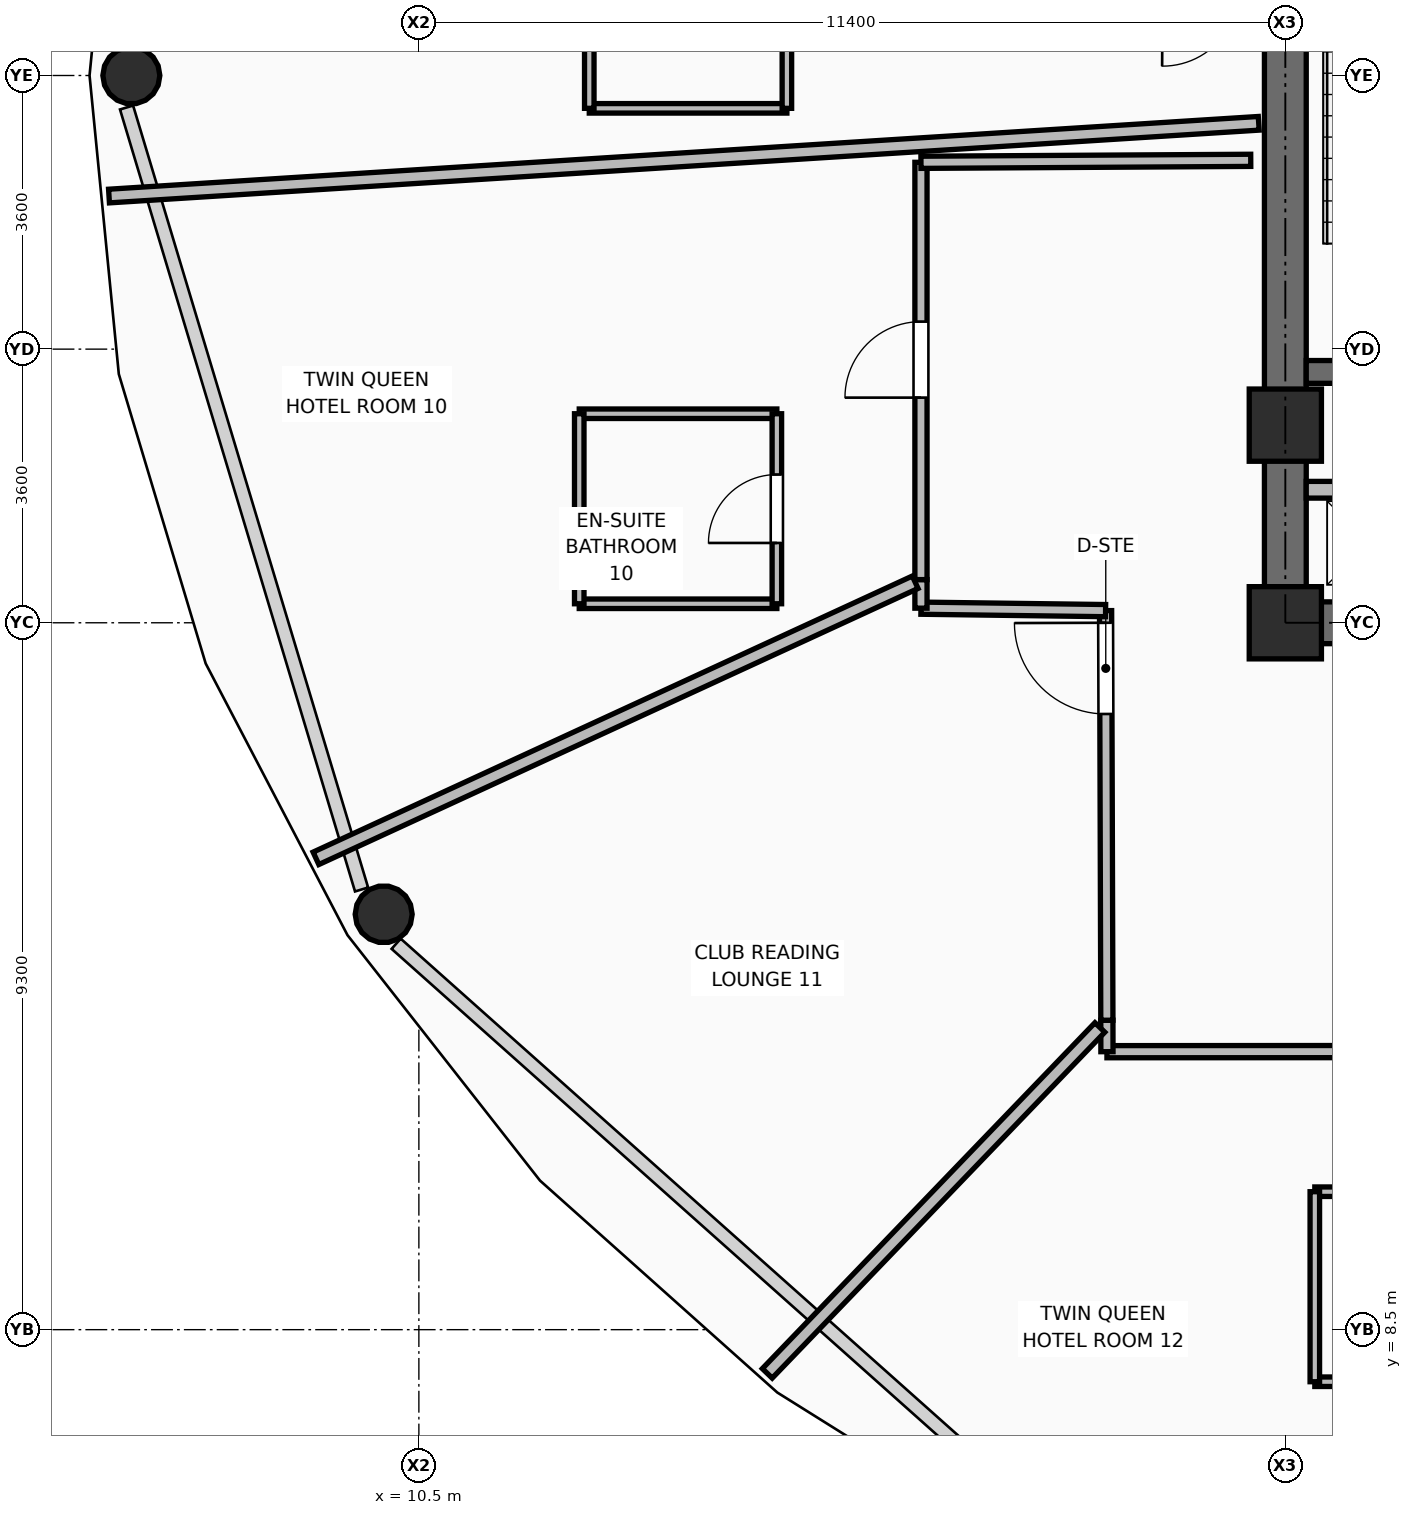
"""IFC4 building model, lengths in metres.
Left out: names, types, materials, properties, quantities, classifications, styles, units other than length and angle.
Written with IfcOpenShell. Run it as: python <this file> out.ifc"""

import sys

from ifc_helpers import new_model, si_unit, direction, frame, frame_2d, origin, origin_2d, place, context, subcontext, project, spatial, rectangle, hollow_circle, extrude, element, fill, save


model = new_model("IFC4")
c1 = context("Model", 3, precision=1e-05, world=origin(), true_north=direction((0.0, 1.0)))
c2 = subcontext(c1, "Body", "Model", "MODEL_VIEW")
j1 = project(units=[si_unit("LENGTHUNIT", "METRE"), si_unit("PLANEANGLEUNIT", "RADIAN")], contexts=[c1])
p1 = place(None, origin())
s1 = spatial("IfcSite", under=j1, at=p1, CompositionType="ELEMENT")
p2 = place(p1, origin())
s2 = spatial("IfcBuilding", under=s1, at=p2, CompositionType="ELEMENT")
p3 = place(p2, frame((0.0, 0.0, 153.45)))
s3 = spatial("IfcBuildingStorey", under=s2, at=p3, CompositionType="ELEMENT", Elevation=153.45)
for number, where, z_axis, x_axis in (
    (1, (21.9, 17.8, 0.0), (0.0, 0.0, 1.0), (1.0, 0.0, 0.0)),
    (2, (21.9, 20.4, 0.0), (0.0, 0.0, 1.0), (1.0, 0.0, 0.0)),
):
    element("IfcColumn", number, at=place(p3, frame(where, z_axis=z_axis, x_axis=x_axis)), inside=s3, PredefinedType="COLUMN", context=c2, shape_type="SweptSolid", body=[
        extrude(rectangle(XDim=0.95, YDim=0.95, at=origin_2d()), origin(), (0.0, 0.0, 1.0), 3.75),
    ])
for number, where, z_axis, x_axis in (
    (3, (6.717, 25.0, 0.0), (0.0, 0.0, 1.0), (1.0, 0.0, 0.0)),
    (4, (10.037, 13.965, 0.0), (0.0, 0.0, 1.0), (1.0, 0.0, 0.0)),
):
    element("IfcColumn", number, at=place(p3, frame(where, z_axis=z_axis, x_axis=x_axis)), inside=s3, PredefinedType="COLUMN", context=c2, shape_type="SweptSolid", body=[
        extrude(hollow_circle(Radius=0.375, WallThickness=0.035, at=origin_2d()), origin(), (0.0, 0.0, 1.0), 3.57),
    ])
p4 = place(p3, frame((21.625, 17.8, 0.0), z_axis=(0.0, 0.0, 1.0), x_axis=(1.0, 0.0, 0.0)))
e5 = element("IfcWall", 5, at=p4, inside=s3, PredefinedType="SHEAR", context=c2, shape_type="SweptSolid", body=[
    extrude(rectangle(XDim=2.125, YDim=0.55, at=frame_2d((1.062, 0.0))), origin(), (0.0, 0.0, 1.0), 3.57),
])
p5 = place(p3, frame((21.9, 18.075, 0.0), z_axis=(0.0, 0.0, 1.0), x_axis=(0.0, 1.0, 0.0)))
e6 = element("IfcWall", 6, at=p5, inside=s3, PredefinedType="SHEAR", context=c2, shape_type="SweptSolid", body=[
    extrude(rectangle(XDim=14.1, YDim=0.55, at=frame_2d((7.05, 0.0))), origin(), (0.0, 0.0, 1.0), 3.57),
])
p6 = place(p3, frame((22.175, 21.1, 0.0), z_axis=(0.0, 0.0, 1.0), x_axis=(1.0, 0.0, 0.0)))
e7 = element("IfcWall", 7, at=p6, inside=s3, PredefinedType="SHEAR", context=c2, shape_type="SweptSolid", body=[
    extrude(rectangle(XDim=3.565, YDim=0.3, at=frame_2d((1.782, 0.0))), origin(), (0.0, 0.0, 1.0), 3.57),
])
p7 = place(p6, frame((2.045, 0.0, 0.0)))
e8 = element("IfcOpeningElement", 8, at=p7, cuts=e7, PredefinedType="OPENING", context=c2, shape_type="SweptSolid", body=[
    extrude(rectangle(XDim=1.05, YDim=2.1, at=frame_2d((0.525, 1.05))), frame((0.0, 0.16, 0.0), z_axis=(0.0, -1.0, 0.0), x_axis=(1.0, 0.0, 0.0)), (0.0, 0.0, 1.0), 0.32),
])
p8 = place(p3, frame((22.175, 19.55, 0.0), z_axis=(0.0, 0.0, 1.0), x_axis=(1.0, 0.0, 0.0)))
e9 = element("IfcWall", 9, at=p8, inside=s3, PredefinedType="PARTITIONING", context=c2, shape_type="SweptSolid", body=[
    extrude(rectangle(XDim=1.615, YDim=0.22, at=frame_2d((0.808, 0.0))), origin(), (0.0, 0.0, 1.0), 2.595),
])
p9 = place(p3, frame((26.886, 12.16, 0.0), z_axis=(0.0, 0.0, 1.0), x_axis=(-0.999999920192, -0.000399520543, 0.0)))
e10 = element("IfcWall", 10, at=p9, inside=s3, PredefinedType="PARTITIONING", context=c2, shape_type="SweptSolid", body=[
    extrude(rectangle(XDim=7.333, YDim=0.16, at=frame_2d((3.667, 0.0))), origin(), (0.0, 0.0, 1.0), 3.006),
])
p10 = place(p9, frame((3.24, 0.0, 0.0)))
e11 = element("IfcOpeningElement", 11, at=p10, cuts=e10, PredefinedType="OPENING", context=c2, shape_type="SweptSolid", body=[
    extrude(rectangle(XDim=1.0, YDim=2.1, at=frame_2d((0.5, 1.05))), frame((0.0, 0.09, 0.0), z_axis=(0.0, -1.0, 0.0), x_axis=(1.0, 0.0, 0.0)), (0.0, 0.0, 1.0), 0.18),
])
p11 = place(p3, frame((19.553, 12.157, 0.0), z_axis=(0.0, 0.0, 1.0), x_axis=(-0.002358484007, 0.999997218773, 0.0)))
e12 = element("IfcWall", 12, at=p11, inside=s3, PredefinedType="PARTITIONING", context=c2, shape_type="SweptSolid", body=[
    extrude(rectangle(XDim=0.414, YDim=0.16, at=frame_2d((0.207, 0.0))), origin(), (0.0, 0.0, 1.0), 3.55),
])
p12 = place(p3, frame((19.552, 12.571, 0.0), z_axis=(0.0, 0.0, 1.0), x_axis=(-0.003171279301, 0.999994971481, 0.0)))
e13 = element("IfcWall", 13, at=p12, inside=s3, PredefinedType="PARTITIONING", context=c2, shape_type="SweptSolid", body=[
    extrude(rectangle(XDim=5.389, YDim=0.16, at=frame_2d((2.694, 0.0))), origin(), (0.0, 0.0, 1.0), 3.006),
])
p13 = place(p12, frame((4.029, 0.0, 0.0)))
e14 = element("IfcOpeningElement", 14, at=p13, cuts=e13, PredefinedType="OPENING", context=c2, shape_type="SweptSolid", body=[
    extrude(rectangle(XDim=1.2, YDim=2.1, at=frame_2d((0.6, 1.05))), frame((0.0, 0.09, 0.0), z_axis=(0.0, -1.0, 0.0), x_axis=(1.0, 0.0, 0.0)), (0.0, 0.0, 1.0), 0.18),
])
p14 = place(p3, frame((19.535, 17.96, 0.0), z_axis=(0.0, 0.0, 1.0), x_axis=(-0.999913324318, 0.013166011206, 0.0)))
e15 = element("IfcWall", 15, at=p14, inside=s3, PredefinedType="PARTITIONING", context=c2, shape_type="SweptSolid", body=[
    extrude(rectangle(XDim=2.429, YDim=0.16, at=frame_2d((1.215, 0.0))), origin(), (0.0, 0.0, 1.0), 3.55),
])
p15 = place(p3, frame((17.106, 17.992, 0.0), z_axis=(0.0, 0.0, 1.0), x_axis=(0.0, 1.0, 0.0)))
e16 = element("IfcWall", 16, at=p15, inside=s3, PredefinedType="PARTITIONING", context=c2, shape_type="SweptSolid", body=[
    extrude(rectangle(XDim=0.376, YDim=0.16, at=frame_2d((0.188, 0.0))), origin(), (0.0, 0.0, 1.0), 3.55),
])
p16 = place(p3, frame((17.106, 18.368, 0.0), z_axis=(0.0, 0.0, 1.0), x_axis=(0.0, 1.0, 0.0)))
e17 = element("IfcWall", 17, at=p16, inside=s3, PredefinedType="PARTITIONING", context=c2, shape_type="SweptSolid", body=[
    extrude(rectangle(XDim=5.49, YDim=0.16, at=frame_2d((2.745, 0.0))), origin(), (0.0, 0.0, 1.0), 3.006),
])
p17 = place(p16, frame((2.394, 0.0, 0.0)))
e18 = element("IfcOpeningElement", 18, at=p17, cuts=e17, PredefinedType="OPENING", context=c2, shape_type="SweptSolid", body=[
    extrude(rectangle(XDim=1.0, YDim=2.1, at=frame_2d((0.5, 1.05))), frame((0.0, 0.09, 0.0), z_axis=(0.0, -1.0, 0.0), x_axis=(1.0, 0.0, 0.0)), (0.0, 0.0, 1.0), 0.18),
])
p18 = place(p3, frame((17.106, 23.858, 0.0), z_axis=(0.0, 0.0, 1.0), x_axis=(0.999981878077, 0.006020258873, 0.0)))
e19 = element("IfcWall", 19, at=p18, inside=s3, PredefinedType="PARTITIONING", context=c2, shape_type="SweptSolid", body=[
    extrude(rectangle(XDim=4.339, YDim=0.16, at=frame_2d((2.169, 0.0))), origin(), (0.0, 0.0, 1.0), 2.595),
])
p19 = place(p3, frame((21.55, 24.371, 0.0), z_axis=(0.0, 0.0, 1.0), x_axis=(-0.998004655197, -0.063140384899, 0.0)))
e20 = element("IfcWall", 20, at=p19, inside=s3, PredefinedType="PARTITIONING", context=c2, shape_type="SweptSolid", body=[
    extrude(rectangle(XDim=15.157, YDim=0.18, at=frame_2d((7.579, 0.0))), origin(), (0.0, 0.0, 1.0), 2.595),
])
p20 = place(p3, frame((17.03, 18.333, 0.0), z_axis=(0.0, 0.0, 1.0), x_axis=(-0.908253037205, -0.418421343155, 0.0)))
e21 = element("IfcWall", 21, at=p20, inside=s3, PredefinedType="PARTITIONING", context=c2, shape_type="SweptSolid", body=[
    extrude(rectangle(XDim=8.68, YDim=0.18, at=frame_2d((4.34, 0.0))), origin(), (0.0, 0.0, 1.0), 2.852),
])
p21 = place(p3, frame((19.46, 12.476, 0.0), z_axis=(0.0, 0.0, 1.0), x_axis=(-0.69310794346, -0.72083380797, 0.0)))
e22 = element("IfcWall", 22, at=p21, inside=s3, PredefinedType="PARTITIONING", context=c2, shape_type="SweptSolid", body=[
    extrude(rectangle(XDim=6.313, YDim=0.18, at=frame_2d((3.157, 0.0))), origin(), (0.0, 0.0, 1.0), 2.852),
])
p22 = place(p3, frame((12.742, 24.568, 0.0), z_axis=(0.0, 0.0, 1.0), x_axis=(1.0, 0.0, 0.0)))
e23 = element("IfcWall", 23, at=p22, inside=s3, PredefinedType="PARTITIONING", context=c2, shape_type="SweptSolid", body=[
    extrude(rectangle(XDim=2.6, YDim=0.125, at=frame_2d((1.3, 0.0))), origin(), (0.0, 0.0, 1.0), 3.55),
])
p23 = place(p3, frame((12.742, 24.568, 0.0), z_axis=(0.0, 0.0, 1.0), x_axis=(0.0, 1.0, 0.0)))
e24 = element("IfcWall", 24, at=p23, inside=s3, PredefinedType="PARTITIONING", context=c2, shape_type="SweptSolid", body=[
    extrude(rectangle(XDim=2.5, YDim=0.125, at=frame_2d((1.25, 0.0))), origin(), (0.0, 0.0, 1.0), 3.55),
])
p24 = place(p3, frame((15.342, 24.568, 0.0), z_axis=(0.0, 0.0, 1.0), x_axis=(0.0, 1.0, 0.0)))
e25 = element("IfcWall", 25, at=p24, inside=s3, PredefinedType="PARTITIONING", context=c2, shape_type="SweptSolid", body=[
    extrude(rectangle(XDim=2.5, YDim=0.125, at=frame_2d((1.25, 0.0))), origin(), (0.0, 0.0, 1.0), 3.55),
])
p25 = place(p24, frame((0.8, 0.0, 0.0)))
e26 = element("IfcOpeningElement", 26, at=p25, cuts=e25, PredefinedType="OPENING", context=c2, shape_type="SweptSolid", body=[
    extrude(rectangle(XDim=0.9, YDim=2.1, at=frame_2d((0.45, 1.05))), frame((0.0, 0.073, 0.0), z_axis=(0.0, -1.0, 0.0), x_axis=(1.0, 0.0, 0.0)), (0.0, 0.0, 1.0), 0.145),
])
for number, where, z_axis, x_axis in (
    (27, (12.61, 18.05, 0.0), (0.0, 0.0, 1.0), (1.0, 0.0, 0.0)),
    (28, (12.61, 20.55, 0.0), (0.0, 0.0, 1.0), (1.0, 0.0, 0.0)),
):
    element("IfcWall", number, at=place(p3, frame(where, z_axis=z_axis, x_axis=x_axis)), inside=s3, PredefinedType="PARTITIONING", context=c2, shape_type="SweptSolid", body=[
        extrude(rectangle(XDim=2.6, YDim=0.125, at=frame_2d((1.3, 0.0))), origin(), (0.0, 0.0, 1.0), 3.55),
    ])
p26 = place(p3, frame((12.61, 18.05, 0.0), z_axis=(0.0, 0.0, 1.0), x_axis=(0.0, 1.0, 0.0)))
e29 = element("IfcWall", 29, at=p26, inside=s3, PredefinedType="PARTITIONING", context=c2, shape_type="SweptSolid", body=[
    extrude(rectangle(XDim=2.5, YDim=0.125, at=frame_2d((1.25, 0.0))), origin(), (0.0, 0.0, 1.0), 3.55),
])
p27 = place(p3, frame((15.21, 18.05, 0.0), z_axis=(0.0, 0.0, 1.0), x_axis=(0.0, 1.0, 0.0)))
e30 = element("IfcWall", 30, at=p27, inside=s3, PredefinedType="PARTITIONING", context=c2, shape_type="SweptSolid", body=[
    extrude(rectangle(XDim=2.5, YDim=0.125, at=frame_2d((1.25, 0.0))), origin(), (0.0, 0.0, 1.0), 3.55),
])
p28 = place(p27, frame((0.8, 0.0, 0.0)))
e31 = element("IfcOpeningElement", 31, at=p28, cuts=e30, PredefinedType="OPENING", context=c2, shape_type="SweptSolid", body=[
    extrude(rectangle(XDim=0.9, YDim=2.1, at=frame_2d((0.45, 1.05))), frame((0.0, 0.073, 0.0), z_axis=(0.0, -1.0, 0.0), x_axis=(1.0, 0.0, 0.0)), (0.0, 0.0, 1.0), 0.145),
])
p29 = place(p3, frame((22.288, 7.815, 0.0), z_axis=(0.0, 0.0, 1.0), x_axis=(1.0, 0.0, 0.0)))
e32 = element("IfcWall", 32, at=p29, inside=s3, PredefinedType="PARTITIONING", context=c2, shape_type="SweptSolid", body=[
    extrude(rectangle(XDim=2.6, YDim=0.125, at=frame_2d((1.3, 0.0))), origin(), (0.0, 0.0, 1.0), 3.55),
])
p30 = place(p3, frame((22.288, 10.315, 0.0), z_axis=(0.0, 0.0, 1.0), x_axis=(1.0, 0.0, 0.0)))
e33 = element("IfcWall", 33, at=p30, inside=s3, PredefinedType="PARTITIONING", context=c2, shape_type="SweptSolid", body=[
    extrude(rectangle(XDim=2.6, YDim=0.125, at=frame_2d((1.3, 0.0))), origin(), (0.0, 0.0, 1.0), 3.55),
])
p31 = place(p30, frame((0.85, 0.0, 0.0)))
e34 = element("IfcOpeningElement", 34, at=p31, cuts=e33, PredefinedType="OPENING", context=c2, shape_type="SweptSolid", body=[
    extrude(rectangle(XDim=0.9, YDim=2.1, at=frame_2d((0.45, 1.05))), frame((0.0, 0.073, 0.0), z_axis=(0.0, -1.0, 0.0), x_axis=(1.0, 0.0, 0.0)), (0.0, 0.0, 1.0), 0.145),
])
p32 = place(p3, frame((22.288, 7.815, 0.0), z_axis=(0.0, 0.0, 1.0), x_axis=(0.0, 1.0, 0.0)))
e35 = element("IfcWall", 35, at=p32, inside=s3, PredefinedType="PARTITIONING", context=c2, shape_type="SweptSolid", body=[
    extrude(rectangle(XDim=2.5, YDim=0.125, at=frame_2d((1.25, 0.0))), origin(), (0.0, 0.0, 1.0), 3.55),
])
p33 = place(p28, origin())
e36 = element("IfcDoor", 36, at=p33, inside=s3, OperationType="SINGLE_SWING_LEFT", PredefinedType="DOOR", context=c2, shape_type="SweptSolid", body=[
    extrude(rectangle(XDim=0.9, YDim=2.1, at=frame_2d((0.45, 1.05))), frame((0.0, 0.025, 0.0), z_axis=(0.0, -1.0, 0.0), x_axis=(1.0, 0.0, 0.0)), (0.0, 0.0, 1.0), 0.05),
])
fill(e31, e36)
p34 = place(p17, origin())
e37 = element("IfcDoor", 37, at=p34, inside=s3, OperationType="SINGLE_SWING_LEFT", PredefinedType="DOOR", context=c2, shape_type="SweptSolid", body=[
    extrude(rectangle(XDim=1.0, YDim=2.1, at=frame_2d((0.5, 1.05))), frame((0.0, 0.025, 0.0), z_axis=(0.0, -1.0, 0.0), x_axis=(1.0, 0.0, 0.0)), (0.0, 0.0, 1.0), 0.05),
])
fill(e18, e37)
p35 = place(p13, origin())
e38 = element("IfcDoor", 38, at=p35, inside=s3, OperationType="SINGLE_SWING_RIGHT", PredefinedType="DOOR", context=c2, shape_type="SweptSolid", body=[
    extrude(rectangle(XDim=1.2, YDim=2.1, at=frame_2d((0.6, 1.05))), frame((0.0, 0.025, 0.0), z_axis=(0.0, -1.0, 0.0), x_axis=(1.0, 0.0, 0.0)), (0.0, 0.0, 1.0), 0.05),
])
fill(e14, e38)
save(model, sys.argv[1])
